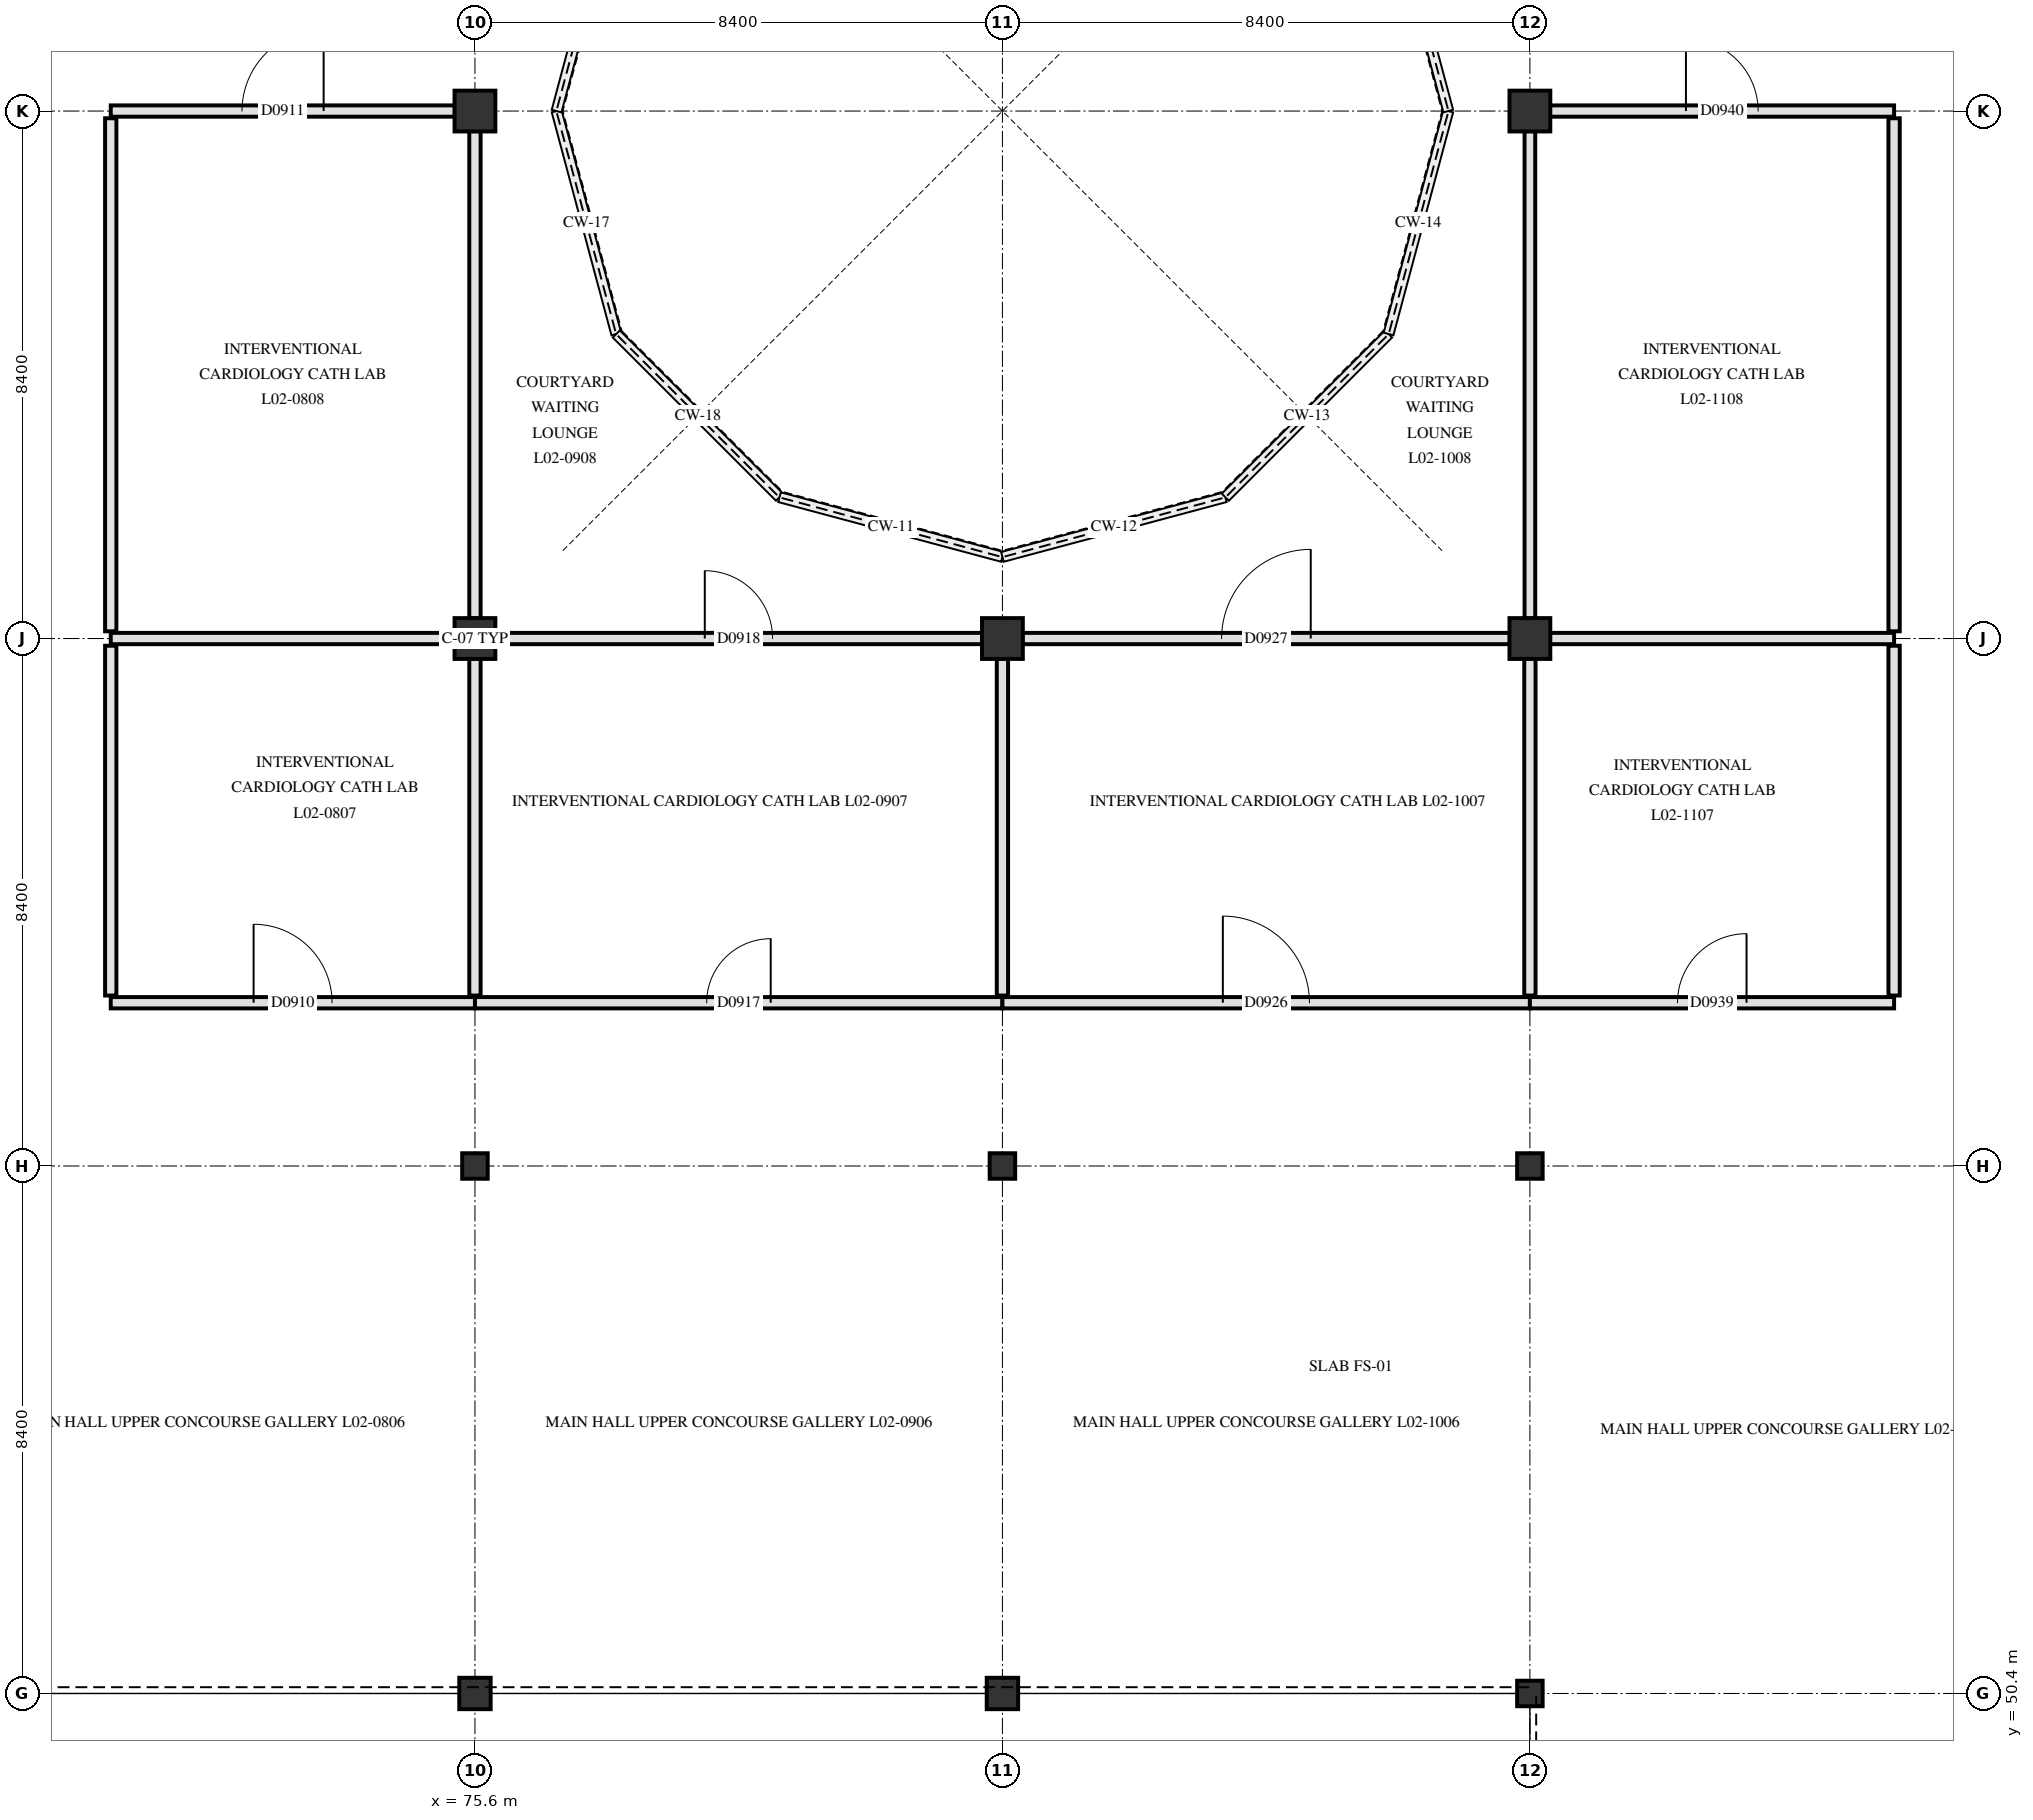
"""IFC4 building model, lengths in metres.
Left out: names, types, materials, properties, quantities, classifications, styles, units other than length and angle.
Written with IfcOpenShell. Run it as: python <this file> out.ifc"""

import sys

from ifc_helpers import new_model, si_unit, direction, frame, frame_2d, origin, origin_2d, place, context, subcontext, project, spatial, rectangle, circle, hollow_circle, extrude, element, fill, save


model = new_model("IFC4")
c1 = context("Model", 3, precision=1e-05, world=origin(), true_north=direction((0.0, 1.0)))
c2 = subcontext(c1, "Body", "Model", "MODEL_VIEW")
j1 = project(units=[si_unit("LENGTHUNIT", "METRE"), si_unit("PLANEANGLEUNIT", "RADIAN")], contexts=[c1])
p1 = place(None, origin())
s1 = spatial("IfcSite", under=j1, at=p1, CompositionType="ELEMENT")
p2 = place(p1, origin())
s2 = spatial("IfcBuilding", under=s1, at=p2, CompositionType="ELEMENT")
p3 = place(p2, frame((0.0, 0.0, 9.3)))
s3 = spatial("IfcBuildingStorey", under=s2, at=p3, CompositionType="ELEMENT", Elevation=9.3)
p4 = place(p3, frame((75.6, 50.4, 0.0), z_axis=(0.0, 0.0, 1.0), x_axis=(1.0, 0.0, 0.0)))
e1 = element("IfcColumn", 1, at=p4, inside=s3, PredefinedType="COLUMN", context=c2, shape_type="SweptSolid", body=[
    extrude(rectangle(XDim=0.5, YDim=0.5, at=origin_2d()), origin(), (0.0, 0.0, 1.0), 5.1),
])
p5 = place(p3, frame((75.6, 58.8, 0.0), z_axis=(0.0, 0.0, 1.0), x_axis=(1.0, 0.0, 0.0)))
e2 = element("IfcColumn", 2, at=p5, inside=s3, PredefinedType="COLUMN", context=c2, shape_type="SweptSolid", body=[
    extrude(hollow_circle(Radius=0.203, WallThickness=0.016, at=origin_2d()), origin(), (0.0, 0.0, 1.0), 5.1),
])
for number, where, z_axis, x_axis in (
    (3, (75.6, 67.2, 0.0), (0.0, 0.0, 1.0), (1.0, 0.0, 0.0)),
    (4, (75.6, 75.6, 0.0), (0.0, 0.0, 1.0), (1.0, 0.0, 0.0)),
):
    element("IfcColumn", number, at=place(p3, frame(where, z_axis=z_axis, x_axis=x_axis)), inside=s3, PredefinedType="COLUMN", context=c2, shape_type="SweptSolid", body=[
        extrude(circle(Radius=0.325, at=origin_2d()), origin(), (0.0, 0.0, 1.0), 5.1),
    ])
p6 = place(p3, frame((84.0, 50.4, 0.0), z_axis=(0.0, 0.0, 1.0), x_axis=(1.0, 0.0, 0.0)))
e5 = element("IfcColumn", 5, at=p6, inside=s3, PredefinedType="COLUMN", context=c2, shape_type="SweptSolid", body=[
    extrude(rectangle(XDim=0.5, YDim=0.5, at=origin_2d()), origin(), (0.0, 0.0, 1.0), 5.1),
])
p7 = place(p3, frame((84.0, 58.8, 0.0), z_axis=(0.0, 0.0, 1.0), x_axis=(1.0, 0.0, 0.0)))
e6 = element("IfcColumn", 6, at=p7, inside=s3, PredefinedType="COLUMN", context=c2, shape_type="SweptSolid", body=[
    extrude(hollow_circle(Radius=0.203, WallThickness=0.016, at=origin_2d()), origin(), (0.0, 0.0, 1.0), 5.1),
])
p8 = place(p3, frame((84.0, 67.2, 0.0), z_axis=(0.0, 0.0, 1.0), x_axis=(1.0, 0.0, 0.0)))
e7 = element("IfcColumn", 7, at=p8, inside=s3, PredefinedType="COLUMN", context=c2, shape_type="SweptSolid", body=[
    extrude(circle(Radius=0.325, at=origin_2d()), origin(), (0.0, 0.0, 1.0), 5.1),
])
for number, where, z_axis, x_axis in (
    (8, (92.4, 50.4, 0.0), (0.0, 0.0, 1.0), (1.0, 0.0, 0.0)),
    (9, (92.4, 58.8, 0.0), (0.0, 0.0, 1.0), (1.0, 0.0, 0.0)),
):
    element("IfcColumn", number, at=place(p3, frame(where, z_axis=z_axis, x_axis=x_axis)), inside=s3, PredefinedType="COLUMN", context=c2, shape_type="SweptSolid", body=[
        extrude(hollow_circle(Radius=0.203, WallThickness=0.016, at=origin_2d()), origin(), (0.0, 0.0, 1.0), 5.1),
    ])
for number, where, z_axis, x_axis in (
    (10, (92.4, 67.2, 0.0), (0.0, 0.0, 1.0), (1.0, 0.0, 0.0)),
    (11, (92.4, 75.6, 0.0), (0.0, 0.0, 1.0), (1.0, 0.0, 0.0)),
):
    element("IfcColumn", number, at=place(p3, frame(where, z_axis=z_axis, x_axis=x_axis)), inside=s3, PredefinedType="COLUMN", context=c2, shape_type="SweptSolid", body=[
        extrude(circle(Radius=0.325, at=origin_2d()), origin(), (0.0, 0.0, 1.0), 5.1),
    ])
p9 = place(p3, frame((69.8, 61.4, 0.0), z_axis=(0.0, 0.0, 1.0), x_axis=(1.0, 0.0, 0.0)))
e12 = element("IfcWall", 12, at=p9, inside=s3, PredefinedType="PARTITIONING", context=c2, shape_type="SweptSolid", body=[
    extrude(rectangle(XDim=5.8, YDim=0.18, at=frame_2d((2.9, 0.0))), origin(), (0.0, 0.0, 1.0), 4.17),
])
p10 = place(p9, frame((2.275, 0.0, 0.0)))
e13 = element("IfcOpeningElement", 13, at=p10, cuts=e12, PredefinedType="OPENING", context=c2, shape_type="SweptSolid", body=[
    extrude(rectangle(XDim=1.25, YDim=2.2, at=frame_2d((0.625, 1.1))), frame((0.0, 0.1, 0.0), z_axis=(0.0, -1.0, 0.0), x_axis=(1.0, 0.0, 0.0)), (0.0, 0.0, 1.0), 0.2),
])
p11 = place(p3, frame((75.6, 61.4, 0.0), z_axis=(0.0, 0.0, 1.0), x_axis=(1.0, 0.0, 0.0)))
e14 = element("IfcWall", 14, at=p11, inside=s3, PredefinedType="PARTITIONING", context=c2, shape_type="SweptSolid", body=[
    extrude(rectangle(XDim=8.4, YDim=0.18, at=frame_2d((4.2, 0.0))), origin(), (0.0, 0.0, 1.0), 4.17),
])
p12 = place(p11, frame((3.69, 0.0, 0.0)))
e15 = element("IfcOpeningElement", 15, at=p12, cuts=e14, PredefinedType="OPENING", context=c2, shape_type="SweptSolid", body=[
    extrude(rectangle(XDim=1.02, YDim=2.12, at=frame_2d((0.51, 1.06))), frame((0.0, 0.1, 0.0), z_axis=(0.0, -1.0, 0.0), x_axis=(1.0, 0.0, 0.0)), (0.0, 0.0, 1.0), 0.2),
])
p13 = place(p3, frame((84.0, 61.4, 0.0), z_axis=(0.0, 0.0, 1.0), x_axis=(1.0, 0.0, 0.0)))
e16 = element("IfcWall", 16, at=p13, inside=s3, PredefinedType="PARTITIONING", context=c2, shape_type="SweptSolid", body=[
    extrude(rectangle(XDim=8.4, YDim=0.18, at=frame_2d((4.2, 0.0))), origin(), (0.0, 0.0, 1.0), 4.17),
])
p14 = place(p13, frame((3.51, 0.0, 0.0)))
e17 = element("IfcOpeningElement", 17, at=p14, cuts=e16, PredefinedType="OPENING", context=c2, shape_type="SweptSolid", body=[
    extrude(rectangle(XDim=1.38, YDim=2.22, at=frame_2d((0.69, 1.11))), frame((0.0, 0.1, 0.0), z_axis=(0.0, -1.0, 0.0), x_axis=(1.0, 0.0, 0.0)), (0.0, 0.0, 1.0), 0.2),
])
p15 = place(p3, frame((92.4, 61.4, 0.0), z_axis=(0.0, 0.0, 1.0), x_axis=(1.0, 0.0, 0.0)))
e18 = element("IfcWall", 18, at=p15, inside=s3, PredefinedType="PARTITIONING", context=c2, shape_type="SweptSolid", body=[
    extrude(rectangle(XDim=5.8, YDim=0.18, at=frame_2d((2.9, 0.0))), origin(), (0.0, 0.0, 1.0), 4.17),
])
p16 = place(p15, frame((2.35, 0.0, 0.0)))
e19 = element("IfcOpeningElement", 19, at=p16, cuts=e18, PredefinedType="OPENING", context=c2, shape_type="SweptSolid", body=[
    extrude(rectangle(XDim=1.1, YDim=2.15, at=frame_2d((0.55, 1.075))), frame((0.0, 0.1, 0.0), z_axis=(0.0, -1.0, 0.0), x_axis=(1.0, 0.0, 0.0)), (0.0, 0.0, 1.0), 0.2),
])
p17 = place(p3, frame((69.8, 67.2, 0.0), z_axis=(0.0, 0.0, 1.0), x_axis=(1.0, 0.0, 0.0)))
e20 = element("IfcWall", 20, at=p17, inside=s3, PredefinedType="PARTITIONING", context=c2, shape_type="SweptSolid", body=[
    extrude(rectangle(XDim=5.48, YDim=0.18, at=frame_2d((2.74, 0.0))), origin(), (0.0, 0.0, 1.0), 4.17),
])
p18 = place(p3, frame((75.92, 67.2, 0.0), z_axis=(0.0, 0.0, 1.0), x_axis=(1.0, 0.0, 0.0)))
e21 = element("IfcWall", 21, at=p18, inside=s3, PredefinedType="PARTITIONING", context=c2, shape_type="SweptSolid", body=[
    extrude(rectangle(XDim=7.76, YDim=0.18, at=frame_2d((3.88, 0.0))), origin(), (0.0, 0.0, 1.0), 4.17),
])
p19 = place(p18, frame((3.34, 0.0, 0.0)))
e22 = element("IfcOpeningElement", 22, at=p19, cuts=e21, PredefinedType="OPENING", context=c2, shape_type="SweptSolid", body=[
    extrude(rectangle(XDim=1.08, YDim=2.12, at=frame_2d((0.54, 1.06))), frame((0.0, 0.1, 0.0), z_axis=(0.0, -1.0, 0.0), x_axis=(1.0, 0.0, 0.0)), (0.0, 0.0, 1.0), 0.2),
])
p20 = place(p3, frame((84.32, 67.2, 0.0), z_axis=(0.0, 0.0, 1.0), x_axis=(1.0, 0.0, 0.0)))
e23 = element("IfcWall", 23, at=p20, inside=s3, PredefinedType="PARTITIONING", context=c2, shape_type="SweptSolid", body=[
    extrude(rectangle(XDim=7.76, YDim=0.18, at=frame_2d((3.88, 0.0))), origin(), (0.0, 0.0, 1.0), 4.17),
])
p21 = place(p20, frame((3.17, 0.0, 0.0)))
e24 = element("IfcOpeningElement", 24, at=p21, cuts=e23, PredefinedType="OPENING", context=c2, shape_type="SweptSolid", body=[
    extrude(rectangle(XDim=1.42, YDim=2.22, at=frame_2d((0.71, 1.11))), frame((0.0, 0.1, 0.0), z_axis=(0.0, -1.0, 0.0), x_axis=(1.0, 0.0, 0.0)), (0.0, 0.0, 1.0), 0.2),
])
p22 = place(p3, frame((92.72, 67.2, 0.0), z_axis=(0.0, 0.0, 1.0), x_axis=(1.0, 0.0, 0.0)))
e25 = element("IfcWall", 25, at=p22, inside=s3, PredefinedType="PARTITIONING", context=c2, shape_type="SweptSolid", body=[
    extrude(rectangle(XDim=5.48, YDim=0.18, at=frame_2d((2.74, 0.0))), origin(), (0.0, 0.0, 1.0), 4.17),
])
p23 = place(p3, frame((69.8, 75.6, 0.0), z_axis=(0.0, 0.0, 1.0), x_axis=(1.0, 0.0, 0.0)))
e26 = element("IfcWall", 26, at=p23, inside=s3, PredefinedType="PARTITIONING", context=c2, shape_type="SweptSolid", body=[
    extrude(rectangle(XDim=5.48, YDim=0.18, at=frame_2d((2.74, 0.0))), origin(), (0.0, 0.0, 1.0), 4.17),
])
p24 = place(p23, frame((2.09, 0.0, 0.0)))
e27 = element("IfcOpeningElement", 27, at=p24, cuts=e26, PredefinedType="OPENING", context=c2, shape_type="SweptSolid", body=[
    extrude(rectangle(XDim=1.3, YDim=2.2, at=frame_2d((0.65, 1.1))), frame((0.0, 0.1, 0.0), z_axis=(0.0, -1.0, 0.0), x_axis=(1.0, 0.0, 0.0)), (0.0, 0.0, 1.0), 0.2),
])
p25 = place(p3, frame((92.72, 75.6, 0.0), z_axis=(0.0, 0.0, 1.0), x_axis=(1.0, 0.0, 0.0)))
e28 = element("IfcWall", 28, at=p25, inside=s3, PredefinedType="PARTITIONING", context=c2, shape_type="SweptSolid", body=[
    extrude(rectangle(XDim=5.48, YDim=0.18, at=frame_2d((2.74, 0.0))), origin(), (0.0, 0.0, 1.0), 4.17),
])
p26 = place(p25, frame((2.165, 0.0, 0.0)))
e29 = element("IfcOpeningElement", 29, at=p26, cuts=e28, PredefinedType="OPENING", context=c2, shape_type="SweptSolid", body=[
    extrude(rectangle(XDim=1.15, YDim=2.15, at=frame_2d((0.575, 1.075))), frame((0.0, 0.1, 0.0), z_axis=(0.0, -1.0, 0.0), x_axis=(1.0, 0.0, 0.0)), (0.0, 0.0, 1.0), 0.2),
])
p27 = place(p3, frame((69.8, 61.515, 0.0), z_axis=(0.0, 0.0, 1.0), x_axis=(0.0, 1.0, 0.0)))
e30 = element("IfcWall", 30, at=p27, inside=s3, PredefinedType="PARTITIONING", context=c2, shape_type="SweptSolid", body=[
    extrude(rectangle(XDim=5.57, YDim=0.18, at=frame_2d((2.785, 0.0))), origin(), (0.0, 0.0, 1.0), 4.17),
])
p28 = place(p3, frame((69.8, 67.315, 0.0), z_axis=(0.0, 0.0, 1.0), x_axis=(0.0, 1.0, 0.0)))
e31 = element("IfcWall", 31, at=p28, inside=s3, PredefinedType="PARTITIONING", context=c2, shape_type="SweptSolid", body=[
    extrude(rectangle(XDim=8.17, YDim=0.18, at=frame_2d((4.085, 0.0))), origin(), (0.0, 0.0, 1.0), 4.17),
])
p29 = place(p3, frame((75.6, 61.515, 0.0), z_axis=(0.0, 0.0, 1.0), x_axis=(0.0, 1.0, 0.0)))
e32 = element("IfcWall", 32, at=p29, inside=s3, PredefinedType="PARTITIONING", context=c2, shape_type="SweptSolid", body=[
    extrude(rectangle(XDim=5.365, YDim=0.18, at=frame_2d((2.683, 0.0))), origin(), (0.0, 0.0, 1.0), 4.17),
])
p30 = place(p3, frame((75.6, 67.52, 0.0), z_axis=(0.0, 0.0, 1.0), x_axis=(0.0, 1.0, 0.0)))
e33 = element("IfcWall", 33, at=p30, inside=s3, PredefinedType="PARTITIONING", context=c2, shape_type="SweptSolid", body=[
    extrude(rectangle(XDim=7.76, YDim=0.18, at=frame_2d((3.88, 0.0))), origin(), (0.0, 0.0, 1.0), 4.17),
])
for number, where, z_axis, x_axis in (
    (34, (84.0, 61.515, 0.0), (0.0, 0.0, 1.0), (0.0, 1.0, 0.0)),
    (35, (92.4, 61.515, 0.0), (0.0, 0.0, 1.0), (0.0, 1.0, 0.0)),
):
    element("IfcWall", number, at=place(p3, frame(where, z_axis=z_axis, x_axis=x_axis)), inside=s3, PredefinedType="PARTITIONING", context=c2, shape_type="SweptSolid", body=[
        extrude(rectangle(XDim=5.365, YDim=0.18, at=frame_2d((2.683, 0.0))), origin(), (0.0, 0.0, 1.0), 4.17),
    ])
p31 = place(p3, frame((92.4, 67.52, 0.0), z_axis=(0.0, 0.0, 1.0), x_axis=(0.0, 1.0, 0.0)))
e36 = element("IfcWall", 36, at=p31, inside=s3, PredefinedType="PARTITIONING", context=c2, shape_type="SweptSolid", body=[
    extrude(rectangle(XDim=7.76, YDim=0.17, at=frame_2d((3.88, 0.0))), origin(), (0.0, 0.0, 1.0), 4.17),
])
p32 = place(p3, frame((98.2, 61.515, 0.0), z_axis=(0.0, 0.0, 1.0), x_axis=(0.0, 1.0, 0.0)))
e37 = element("IfcWall", 37, at=p32, inside=s3, PredefinedType="PARTITIONING", context=c2, shape_type="SweptSolid", body=[
    extrude(rectangle(XDim=5.57, YDim=0.18, at=frame_2d((2.785, 0.0))), origin(), (0.0, 0.0, 1.0), 4.17),
])
p33 = place(p3, frame((98.2, 67.315, 0.0), z_axis=(0.0, 0.0, 1.0), x_axis=(0.0, 1.0, 0.0)))
e38 = element("IfcWall", 38, at=p33, inside=s3, PredefinedType="PARTITIONING", context=c2, shape_type="SweptSolid", body=[
    extrude(rectangle(XDim=8.17, YDim=0.18, at=frame_2d((4.085, 0.0))), origin(), (0.0, 0.0, 1.0), 4.17),
])
p34 = place(p10, origin())
e39 = element("IfcDoor", 39, at=p34, inside=s3, OperationType="SINGLE_SWING_LEFT", PredefinedType="DOOR", context=c2, shape_type="SweptSolid", body=[
    extrude(rectangle(XDim=1.25, YDim=2.2, at=frame_2d((0.625, 1.1))), frame((0.0, 0.025, 0.0), z_axis=(0.0, -1.0, 0.0), x_axis=(1.0, 0.0, 0.0)), (0.0, 0.0, 1.0), 0.05),
])
fill(e13, e39)
p35 = place(p24, origin())
e40 = element("IfcDoor", 40, at=p35, inside=s3, OperationType="SINGLE_SWING_RIGHT", PredefinedType="DOOR", context=c2, shape_type="SweptSolid", body=[
    extrude(rectangle(XDim=1.3, YDim=2.2, at=frame_2d((0.65, 1.1))), frame((0.0, 0.025, 0.0), z_axis=(0.0, -1.0, 0.0), x_axis=(1.0, 0.0, 0.0)), (0.0, 0.0, 1.0), 0.05),
])
fill(e27, e40)
p36 = place(p12, origin())
e41 = element("IfcDoor", 41, at=p36, inside=s3, OperationType="SINGLE_SWING_RIGHT", PredefinedType="DOOR", context=c2, shape_type="SweptSolid", body=[
    extrude(rectangle(XDim=1.02, YDim=2.12, at=frame_2d((0.51, 1.06))), frame((0.0, 0.025, 0.0), z_axis=(0.0, -1.0, 0.0), x_axis=(1.0, 0.0, 0.0)), (0.0, 0.0, 1.0), 0.05),
])
fill(e15, e41)
p37 = place(p19, origin())
e42 = element("IfcDoor", 42, at=p37, inside=s3, OperationType="SINGLE_SWING_LEFT", PredefinedType="DOOR", context=c2, shape_type="SweptSolid", body=[
    extrude(rectangle(XDim=1.08, YDim=2.12, at=frame_2d((0.54, 1.06))), frame((0.0, 0.025, 0.0), z_axis=(0.0, -1.0, 0.0), x_axis=(1.0, 0.0, 0.0)), (0.0, 0.0, 1.0), 0.05),
])
fill(e22, e42)
p38 = place(p14, origin())
e43 = element("IfcDoor", 43, at=p38, inside=s3, OperationType="SINGLE_SWING_LEFT", PredefinedType="DOOR", context=c2, shape_type="SweptSolid", body=[
    extrude(rectangle(XDim=1.38, YDim=2.22, at=frame_2d((0.69, 1.11))), frame((0.0, 0.025, 0.0), z_axis=(0.0, -1.0, 0.0), x_axis=(1.0, 0.0, 0.0)), (0.0, 0.0, 1.0), 0.05),
])
fill(e17, e43)
p39 = place(p21, origin())
e44 = element("IfcDoor", 44, at=p39, inside=s3, OperationType="SINGLE_SWING_RIGHT", PredefinedType="DOOR", context=c2, shape_type="SweptSolid", body=[
    extrude(rectangle(XDim=1.42, YDim=2.22, at=frame_2d((0.71, 1.11))), frame((0.0, 0.025, 0.0), z_axis=(0.0, -1.0, 0.0), x_axis=(1.0, 0.0, 0.0)), (0.0, 0.0, 1.0), 0.05),
])
fill(e24, e44)
p40 = place(p16, origin())
e45 = element("IfcDoor", 45, at=p40, inside=s3, OperationType="SINGLE_SWING_RIGHT", PredefinedType="DOOR", context=c2, shape_type="SweptSolid", body=[
    extrude(rectangle(XDim=1.1, YDim=2.15, at=frame_2d((0.55, 1.075))), frame((0.0, 0.025, 0.0), z_axis=(0.0, -1.0, 0.0), x_axis=(1.0, 0.0, 0.0)), (0.0, 0.0, 1.0), 0.05),
])
fill(e19, e45)
p41 = place(p26, origin())
e46 = element("IfcDoor", 46, at=p41, inside=s3, OperationType="SINGLE_SWING_LEFT", PredefinedType="DOOR", context=c2, shape_type="SweptSolid", body=[
    extrude(rectangle(XDim=1.15, YDim=2.15, at=frame_2d((0.575, 1.075))), frame((0.0, 0.025, 0.0), z_axis=(0.0, -1.0, 0.0), x_axis=(1.0, 0.0, 0.0)), (0.0, 0.0, 1.0), 0.05),
])
fill(e29, e46)
save(model, sys.argv[1])
